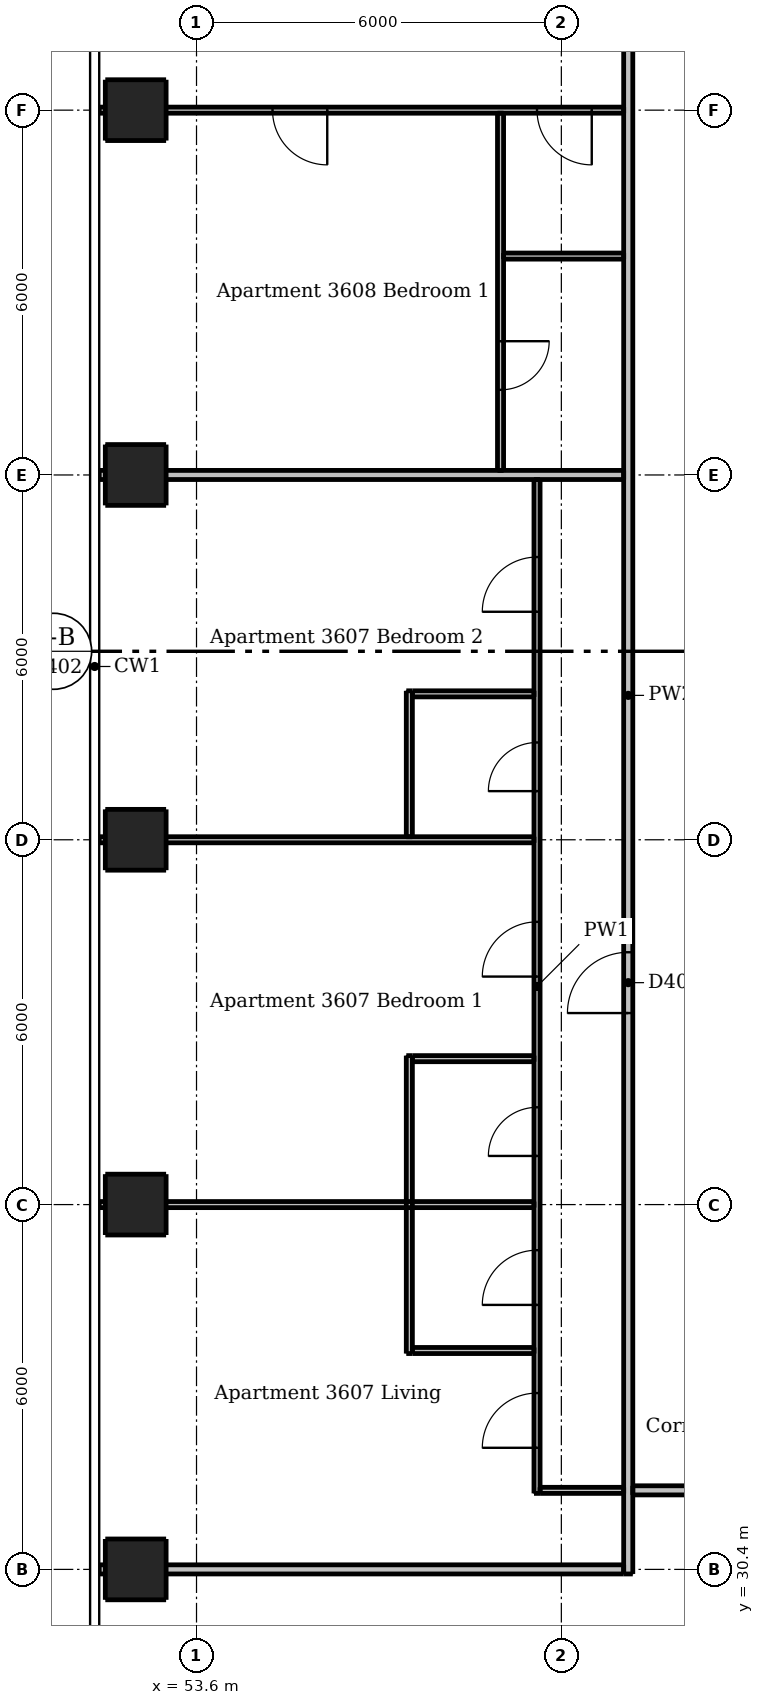
"""IFC4 building model, lengths in metres.
Left out: names, types, materials, properties, quantities, classifications, styles, units other than length and angle.
Written with IfcOpenShell. Run it as: python <this file> out.ifc"""

import sys

from ifc_helpers import new_model, si_unit, direction, frame, frame_2d, origin, origin_2d, place, context, subcontext, project, spatial, rectangle, extrude, element, fill, save


model = new_model("IFC4")
c1 = context("Model", 3, precision=1e-05, world=origin(), true_north=direction((0.0, 1.0)))
c2 = subcontext(c1, "Body", "Model", "MODEL_VIEW")
j1 = project(units=[si_unit("LENGTHUNIT", "METRE"), si_unit("PLANEANGLEUNIT", "RADIAN")], contexts=[c1])
p1 = place(None, origin())
s1 = spatial("IfcSite", under=j1, at=p1, CompositionType="ELEMENT")
p2 = place(p1, origin())
s2 = spatial("IfcBuilding", under=s1, at=p2, CompositionType="ELEMENT")
p3 = place(p2, frame((0.0, 0.0, 137.2)))
s3 = spatial("IfcBuildingStorey", under=s2, at=p3, CompositionType="ELEMENT", Elevation=137.2)
for number, where, z_axis, x_axis in (
    (1, (52.6, 30.4, 0.0), (0.0, 0.0, 1.0), (1.0, 0.0, 0.0)),
    (2, (52.6, 36.4, 0.0), (0.0, 0.0, 1.0), (1.0, 0.0, 0.0)),
    (3, (52.6, 42.4, 0.0), (0.0, 0.0, 1.0), (1.0, 0.0, 0.0)),
    (4, (52.6, 48.4, 0.0), (0.0, 0.0, 1.0), (1.0, 0.0, 0.0)),
    (5, (52.6, 54.4, 0.0), (0.0, 0.0, 1.0), (1.0, 0.0, 0.0)),
):
    element("IfcColumn", number, at=place(p3, frame(where, z_axis=z_axis, x_axis=x_axis)), inside=s3, PredefinedType="COLUMN", context=c2, shape_type="SweptSolid", body=[
        extrude(rectangle(XDim=1.0, YDim=1.0, at=origin_2d()), origin(), (0.0, 0.0, 1.0), 3.05),
    ])
p4 = place(p3, frame((57.1, 33.95, 0.0), z_axis=(0.0, 0.0, 1.0), x_axis=(0.0, 1.0, 0.0)))
e6 = element("IfcWall", 6, at=p4, inside=s3, PredefinedType="PARTITIONING", context=c2, shape_type="SweptSolid", body=[
    extrude(rectangle(XDim=4.9, YDim=0.1, at=frame_2d((2.45, 0.0))), origin(), (0.0, 0.0, 1.0), 3.05),
])
p5 = place(p3, frame((57.1, 42.45, 0.0), z_axis=(0.0, 0.0, 1.0), x_axis=(0.0, 1.0, 0.0)))
e7 = element("IfcWall", 7, at=p5, inside=s3, PredefinedType="PARTITIONING", context=c2, shape_type="SweptSolid", body=[
    extrude(rectangle(XDim=2.4, YDim=0.1, at=frame_2d((1.2, 0.0))), origin(), (0.0, 0.0, 1.0), 3.05),
])
p6 = place(p3, frame((58.6, 54.35, 0.0), z_axis=(0.0, 0.0, 1.0), x_axis=(0.0, -1.0, 0.0)))
e8 = element("IfcWall", 8, at=p6, inside=s3, PredefinedType="PARTITIONING", context=c2, shape_type="SweptSolid", body=[
    extrude(rectangle(XDim=5.875, YDim=0.1, at=frame_2d((2.938, 0.0))), origin(), (0.0, 0.0, 1.0), 3.05),
])
p7 = place(p6, frame((3.75, 0.0, 0.0)))
e9 = element("IfcOpeningElement", 9, at=p7, cuts=e8, PredefinedType="OPENING", context=c2, shape_type="SweptSolid", body=[
    extrude(rectangle(XDim=0.8, YDim=2.1, at=frame_2d((0.4, 1.05))), frame((0.0, 0.06, 0.0), z_axis=(0.0, -1.0, 0.0), x_axis=(1.0, 0.0, 0.0)), (0.0, 0.0, 1.0), 0.12),
])
p8 = place(p3, frame((59.2, 31.65, 0.0), z_axis=(0.0, 0.0, 1.0), x_axis=(0.0, 1.0, 0.0)))
e10 = element("IfcWall", 10, at=p8, inside=s3, PredefinedType="PARTITIONING", context=c2, shape_type="SweptSolid", body=[
    extrude(rectangle(XDim=16.675, YDim=0.1, at=frame_2d((8.337, 0.0))), origin(), (0.0, 0.0, 1.0), 3.05),
])
p9 = place(p8, frame((0.75, 0.0, 0.0)))
e11 = element("IfcOpeningElement", 11, at=p9, cuts=e10, PredefinedType="OPENING", context=c2, shape_type="SweptSolid", body=[
    extrude(rectangle(XDim=0.9, YDim=2.1, at=frame_2d((0.45, 1.05))), frame((0.0, 0.06, 0.0), z_axis=(0.0, -1.0, 0.0), x_axis=(1.0, 0.0, 0.0)), (0.0, 0.0, 1.0), 0.12),
])
p10 = place(p8, frame((3.1, 0.0, 0.0)))
e12 = element("IfcOpeningElement", 12, at=p10, cuts=e10, PredefinedType="OPENING", context=c2, shape_type="SweptSolid", body=[
    extrude(rectangle(XDim=0.9, YDim=2.1, at=frame_2d((0.45, 1.05))), frame((0.0, 0.06, 0.0), z_axis=(0.0, -1.0, 0.0), x_axis=(1.0, 0.0, 0.0)), (0.0, 0.0, 1.0), 0.12),
])
p11 = place(p8, frame((8.5, 0.0, 0.0)))
e13 = element("IfcOpeningElement", 13, at=p11, cuts=e10, PredefinedType="OPENING", context=c2, shape_type="SweptSolid", body=[
    extrude(rectangle(XDim=0.9, YDim=2.1, at=frame_2d((0.45, 1.05))), frame((0.0, 0.06, 0.0), z_axis=(0.0, -1.0, 0.0), x_axis=(1.0, 0.0, 0.0)), (0.0, 0.0, 1.0), 0.12),
])
p12 = place(p8, frame((14.5, 0.0, 0.0)))
e14 = element("IfcOpeningElement", 14, at=p12, cuts=e10, PredefinedType="OPENING", context=c2, shape_type="SweptSolid", body=[
    extrude(rectangle(XDim=0.9, YDim=2.1, at=frame_2d((0.45, 1.05))), frame((0.0, 0.06, 0.0), z_axis=(0.0, -1.0, 0.0), x_axis=(1.0, 0.0, 0.0)), (0.0, 0.0, 1.0), 0.12),
])
p13 = place(p8, frame((5.55, 0.0, 0.0)))
e15 = element("IfcOpeningElement", 15, at=p13, cuts=e10, PredefinedType="OPENING", context=c2, shape_type="SweptSolid", body=[
    extrude(rectangle(XDim=0.8, YDim=2.1, at=frame_2d((0.4, 1.05))), frame((0.0, 0.06, 0.0), z_axis=(0.0, -1.0, 0.0), x_axis=(1.0, 0.0, 0.0)), (0.0, 0.0, 1.0), 0.12),
])
p14 = place(p8, frame((11.55, 0.0, 0.0)))
e16 = element("IfcOpeningElement", 16, at=p14, cuts=e10, PredefinedType="OPENING", context=c2, shape_type="SweptSolid", body=[
    extrude(rectangle(XDim=0.8, YDim=2.1, at=frame_2d((0.4, 1.05))), frame((0.0, 0.06, 0.0), z_axis=(0.0, -1.0, 0.0), x_axis=(1.0, 0.0, 0.0)), (0.0, 0.0, 1.0), 0.12),
])
p15 = place(p3, frame((60.625, 54.4, 0.0), z_axis=(0.0, 0.0, 1.0), x_axis=(-1.0, 0.0, 0.0)))
e17 = element("IfcWall", 17, at=p15, inside=s3, PredefinedType="PARTITIONING", context=c2, shape_type="SweptSolid", body=[
    extrude(rectangle(XDim=8.625, YDim=0.1, at=frame_2d((4.312, 0.0))), origin(), (0.0, 0.0, 1.0), 2.516),
])
p16 = place(p15, frame((0.525, 0.0, 0.0)))
e18 = element("IfcOpeningElement", 18, at=p16, cuts=e17, PredefinedType="OPENING", context=c2, shape_type="SweptSolid", body=[
    extrude(rectangle(XDim=0.9, YDim=2.1, at=frame_2d((0.45, 1.05))), frame((0.0, 0.06, 0.0), z_axis=(0.0, -1.0, 0.0), x_axis=(1.0, 0.0, 0.0)), (0.0, 0.0, 1.0), 0.12),
])
p17 = place(p15, frame((4.875, 0.0, 0.0)))
e19 = element("IfcOpeningElement", 19, at=p17, cuts=e17, PredefinedType="OPENING", context=c2, shape_type="SweptSolid", body=[
    extrude(rectangle(XDim=0.9, YDim=2.1, at=frame_2d((0.45, 1.05))), frame((0.0, 0.06, 0.0), z_axis=(0.0, -1.0, 0.0), x_axis=(1.0, 0.0, 0.0)), (0.0, 0.0, 1.0), 0.12),
])
p18 = place(p3, frame((58.65, 52.0, 0.0), z_axis=(0.0, 0.0, 1.0), x_axis=(1.0, 0.0, 0.0)))
e20 = element("IfcWall", 20, at=p18, inside=s3, PredefinedType="PARTITIONING", context=c2, shape_type="SweptSolid", body=[
    extrude(rectangle(XDim=1.975, YDim=0.1, at=frame_2d((0.988, 0.0))), origin(), (0.0, 0.0, 1.0), 3.05),
])
p19 = place(p3, frame((57.15, 44.8, 0.0), z_axis=(0.0, 0.0, 1.0), x_axis=(1.0, 0.0, 0.0)))
e21 = element("IfcWall", 21, at=p19, inside=s3, PredefinedType="PARTITIONING", context=c2, shape_type="SweptSolid", body=[
    extrude(rectangle(XDim=2.0, YDim=0.1, at=frame_2d((1.0, 0.0))), origin(), (0.0, 0.0, 1.0), 3.05),
])
p20 = place(p3, frame((52.0, 42.4, 0.0), z_axis=(0.0, 0.0, 1.0), x_axis=(1.0, 0.0, 0.0)))
e22 = element("IfcWall", 22, at=p20, inside=s3, PredefinedType="PARTITIONING", context=c2, shape_type="SweptSolid", body=[
    extrude(rectangle(XDim=7.15, YDim=0.1, at=frame_2d((3.575, 0.0))), origin(), (0.0, 0.0, 1.0), 2.516),
])
p21 = place(p3, frame((57.15, 38.8, 0.0), z_axis=(0.0, 0.0, 1.0), x_axis=(1.0, 0.0, 0.0)))
e23 = element("IfcWall", 23, at=p21, inside=s3, PredefinedType="PARTITIONING", context=c2, shape_type="SweptSolid", body=[
    extrude(rectangle(XDim=2.0, YDim=0.1, at=frame_2d((1.0, 0.0))), origin(), (0.0, 0.0, 1.0), 3.05),
])
p22 = place(p3, frame((52.0, 36.4, 0.0), z_axis=(0.0, 0.0, 1.0), x_axis=(1.0, 0.0, 0.0)))
e24 = element("IfcWall", 24, at=p22, inside=s3, PredefinedType="PARTITIONING", context=c2, shape_type="SweptSolid", body=[
    extrude(rectangle(XDim=7.15, YDim=0.1, at=frame_2d((3.575, 0.0))), origin(), (0.0, 0.0, 1.0), 2.516),
])
p23 = place(p3, frame((57.15, 34.0, 0.0), z_axis=(0.0, 0.0, 1.0), x_axis=(1.0, 0.0, 0.0)))
e25 = element("IfcWall", 25, at=p23, inside=s3, PredefinedType="PARTITIONING", context=c2, shape_type="SweptSolid", body=[
    extrude(rectangle(XDim=2.0, YDim=0.1, at=frame_2d((1.0, 0.0))), origin(), (0.0, 0.0, 1.0), 3.05),
])
p24 = place(p3, frame((59.25, 31.7, 0.0), z_axis=(0.0, 0.0, 1.0), x_axis=(1.0, 0.0, 0.0)))
e26 = element("IfcWall", 26, at=p24, inside=s3, PredefinedType="PARTITIONING", context=c2, shape_type="SweptSolid", body=[
    extrude(rectangle(XDim=1.375, YDim=0.1, at=frame_2d((0.688, 0.0))), origin(), (0.0, 0.0, 1.0), 3.05),
])
p25 = place(p3, frame((60.7, 30.325, 0.0), z_axis=(0.0, 0.0, 1.0), x_axis=(0.0, 1.0, 0.0)))
e27 = element("IfcWall", 27, at=p25, inside=s3, PredefinedType="PARTITIONING", context=c2, shape_type="SweptSolid", body=[
    extrude(rectangle(XDim=28.9, YDim=0.15, at=frame_2d((14.45, 0.0))), origin(), (0.0, 0.0, 1.0), 3.05),
])
p26 = place(p25, frame((9.225, 0.0, 0.0)))
e28 = element("IfcOpeningElement", 28, at=p26, cuts=e27, PredefinedType="OPENING", context=c2, shape_type="SweptSolid", body=[
    extrude(rectangle(XDim=1.0, YDim=2.1, at=frame_2d((0.5, 1.05))), frame((0.0, 0.085, 0.0), z_axis=(0.0, -1.0, 0.0), x_axis=(1.0, 0.0, 0.0)), (0.0, 0.0, 1.0), 0.17),
])
p27 = place(p25, frame((26.025, 0.0, 0.0)))
e29 = element("IfcOpeningElement", 29, at=p27, cuts=e27, PredefinedType="OPENING", context=c2, shape_type="SweptSolid", body=[
    extrude(rectangle(XDim=1.0, YDim=2.1, at=frame_2d((0.5, 1.05))), frame((0.0, 0.085, 0.0), z_axis=(0.0, -1.0, 0.0), x_axis=(1.0, 0.0, 0.0)), (0.0, 0.0, 1.0), 0.17),
])
p28 = place(p3, frame((52.0, 48.4, 0.0), z_axis=(0.0, 0.0, 1.0), x_axis=(1.0, 0.0, 0.0)))
e30 = element("IfcWall", 30, at=p28, inside=s3, PredefinedType="PARTITIONING", context=c2, shape_type="SweptSolid", body=[
    extrude(rectangle(XDim=8.625, YDim=0.15, at=frame_2d((4.312, 0.0))), origin(), (0.0, 0.0, 1.0), 2.516),
])
p29 = place(p3, frame((89.525, 31.7, 0.0), z_axis=(0.0, 0.0, 1.0), x_axis=(-1.0, 0.0, 0.0)))
e31 = element("IfcWall", 31, at=p29, inside=s3, PredefinedType="PARTITIONING", context=c2, shape_type="SweptSolid", body=[
    extrude(rectangle(XDim=28.75, YDim=0.15, at=frame_2d((14.375, 0.0))), origin(), (0.0, 0.0, 1.0), 3.05),
])
p30 = place(p29, frame((25.875, 0.0, 0.0)))
e32 = element("IfcOpeningElement", 32, at=p30, cuts=e31, PredefinedType="OPENING", context=c2, shape_type="SweptSolid", body=[
    extrude(rectangle(XDim=1.0, YDim=2.1, at=frame_2d((0.5, 1.05))), frame((0.0, 0.085, 0.0), z_axis=(0.0, -1.0, 0.0), x_axis=(1.0, 0.0, 0.0)), (0.0, 0.0, 1.0), 0.17),
])
p31 = place(p29, frame((9.075, 0.0, 0.0)))
e33 = element("IfcOpeningElement", 33, at=p31, cuts=e31, PredefinedType="OPENING", context=c2, shape_type="SweptSolid", body=[
    extrude(rectangle(XDim=1.0, YDim=2.1, at=frame_2d((0.5, 1.05))), frame((0.0, 0.085, 0.0), z_axis=(0.0, -1.0, 0.0), x_axis=(1.0, 0.0, 0.0)), (0.0, 0.0, 1.0), 0.17),
])
p32 = place(p3, frame((52.0, 30.4, 0.0), z_axis=(0.0, 0.0, 1.0), x_axis=(1.0, 0.0, 0.0)))
e34 = element("IfcWall", 34, at=p32, inside=s3, PredefinedType="PARTITIONING", context=c2, shape_type="SweptSolid", body=[
    extrude(rectangle(XDim=8.625, YDim=0.15, at=frame_2d((4.312, 0.0))), origin(), (0.0, 0.0, 1.0), 2.647),
])
p33 = place(p26, origin())
e35 = element("IfcDoor", 35, at=p33, inside=s3, OperationType="SINGLE_SWING_LEFT", PredefinedType="DOOR", context=c2, shape_type="SweptSolid", body=[
    extrude(rectangle(XDim=1.0, YDim=2.1, at=frame_2d((0.5, 1.05))), frame((0.0, 0.025, 0.0), z_axis=(0.0, -1.0, 0.0), x_axis=(1.0, 0.0, 0.0)), (0.0, 0.0, 1.0), 0.05),
])
fill(e28, e35)
p34 = place(p9, origin())
e36 = element("IfcDoor", 36, at=p34, inside=s3, OperationType="SINGLE_SWING_LEFT", PredefinedType="DOOR", context=c2, shape_type="SweptSolid", body=[
    extrude(rectangle(XDim=0.9, YDim=2.1, at=frame_2d((0.45, 1.05))), frame((0.0, 0.025, 0.0), z_axis=(0.0, -1.0, 0.0), x_axis=(1.0, 0.0, 0.0)), (0.0, 0.0, 1.0), 0.05),
])
fill(e11, e36)
p35 = place(p10, origin())
e37 = element("IfcDoor", 37, at=p35, inside=s3, OperationType="SINGLE_SWING_LEFT", PredefinedType="DOOR", context=c2, shape_type="SweptSolid", body=[
    extrude(rectangle(XDim=0.9, YDim=2.1, at=frame_2d((0.45, 1.05))), frame((0.0, 0.025, 0.0), z_axis=(0.0, -1.0, 0.0), x_axis=(1.0, 0.0, 0.0)), (0.0, 0.0, 1.0), 0.05),
])
fill(e12, e37)
p36 = place(p11, origin())
e38 = element("IfcDoor", 38, at=p36, inside=s3, OperationType="SINGLE_SWING_LEFT", PredefinedType="DOOR", context=c2, shape_type="SweptSolid", body=[
    extrude(rectangle(XDim=0.9, YDim=2.1, at=frame_2d((0.45, 1.05))), frame((0.0, 0.025, 0.0), z_axis=(0.0, -1.0, 0.0), x_axis=(1.0, 0.0, 0.0)), (0.0, 0.0, 1.0), 0.05),
])
fill(e13, e38)
p37 = place(p12, origin())
e39 = element("IfcDoor", 39, at=p37, inside=s3, OperationType="SINGLE_SWING_LEFT", PredefinedType="DOOR", context=c2, shape_type="SweptSolid", body=[
    extrude(rectangle(XDim=0.9, YDim=2.1, at=frame_2d((0.45, 1.05))), frame((0.0, 0.025, 0.0), z_axis=(0.0, -1.0, 0.0), x_axis=(1.0, 0.0, 0.0)), (0.0, 0.0, 1.0), 0.05),
])
fill(e14, e39)
p38 = place(p13, origin())
e40 = element("IfcDoor", 40, at=p38, inside=s3, OperationType="SINGLE_SWING_LEFT", PredefinedType="DOOR", context=c2, shape_type="SweptSolid", body=[
    extrude(rectangle(XDim=0.8, YDim=2.1, at=frame_2d((0.4, 1.05))), frame((0.0, 0.025, 0.0), z_axis=(0.0, -1.0, 0.0), x_axis=(1.0, 0.0, 0.0)), (0.0, 0.0, 1.0), 0.05),
])
fill(e15, e40)
p39 = place(p14, origin())
e41 = element("IfcDoor", 41, at=p39, inside=s3, OperationType="SINGLE_SWING_LEFT", PredefinedType="DOOR", context=c2, shape_type="SweptSolid", body=[
    extrude(rectangle(XDim=0.8, YDim=2.1, at=frame_2d((0.4, 1.05))), frame((0.0, 0.025, 0.0), z_axis=(0.0, -1.0, 0.0), x_axis=(1.0, 0.0, 0.0)), (0.0, 0.0, 1.0), 0.05),
])
fill(e16, e41)
p40 = place(p16, origin())
e42 = element("IfcDoor", 42, at=p40, inside=s3, OperationType="SINGLE_SWING_LEFT", PredefinedType="DOOR", context=c2, shape_type="SweptSolid", body=[
    extrude(rectangle(XDim=0.9, YDim=2.1, at=frame_2d((0.45, 1.05))), frame((0.0, 0.025, 0.0), z_axis=(0.0, -1.0, 0.0), x_axis=(1.0, 0.0, 0.0)), (0.0, 0.0, 1.0), 0.05),
])
fill(e18, e42)
p41 = place(p17, origin())
e43 = element("IfcDoor", 43, at=p41, inside=s3, OperationType="SINGLE_SWING_LEFT", PredefinedType="DOOR", context=c2, shape_type="SweptSolid", body=[
    extrude(rectangle(XDim=0.9, YDim=2.1, at=frame_2d((0.45, 1.05))), frame((0.0, 0.025, 0.0), z_axis=(0.0, -1.0, 0.0), x_axis=(1.0, 0.0, 0.0)), (0.0, 0.0, 1.0), 0.05),
])
fill(e19, e43)
p42 = place(p7, origin())
e44 = element("IfcDoor", 44, at=p42, inside=s3, OperationType="SINGLE_SWING_LEFT", PredefinedType="DOOR", context=c2, shape_type="SweptSolid", body=[
    extrude(rectangle(XDim=0.8, YDim=2.1, at=frame_2d((0.4, 1.05))), frame((0.0, 0.025, 0.0), z_axis=(0.0, -1.0, 0.0), x_axis=(1.0, 0.0, 0.0)), (0.0, 0.0, 1.0), 0.05),
])
fill(e9, e44)
save(model, sys.argv[1])
